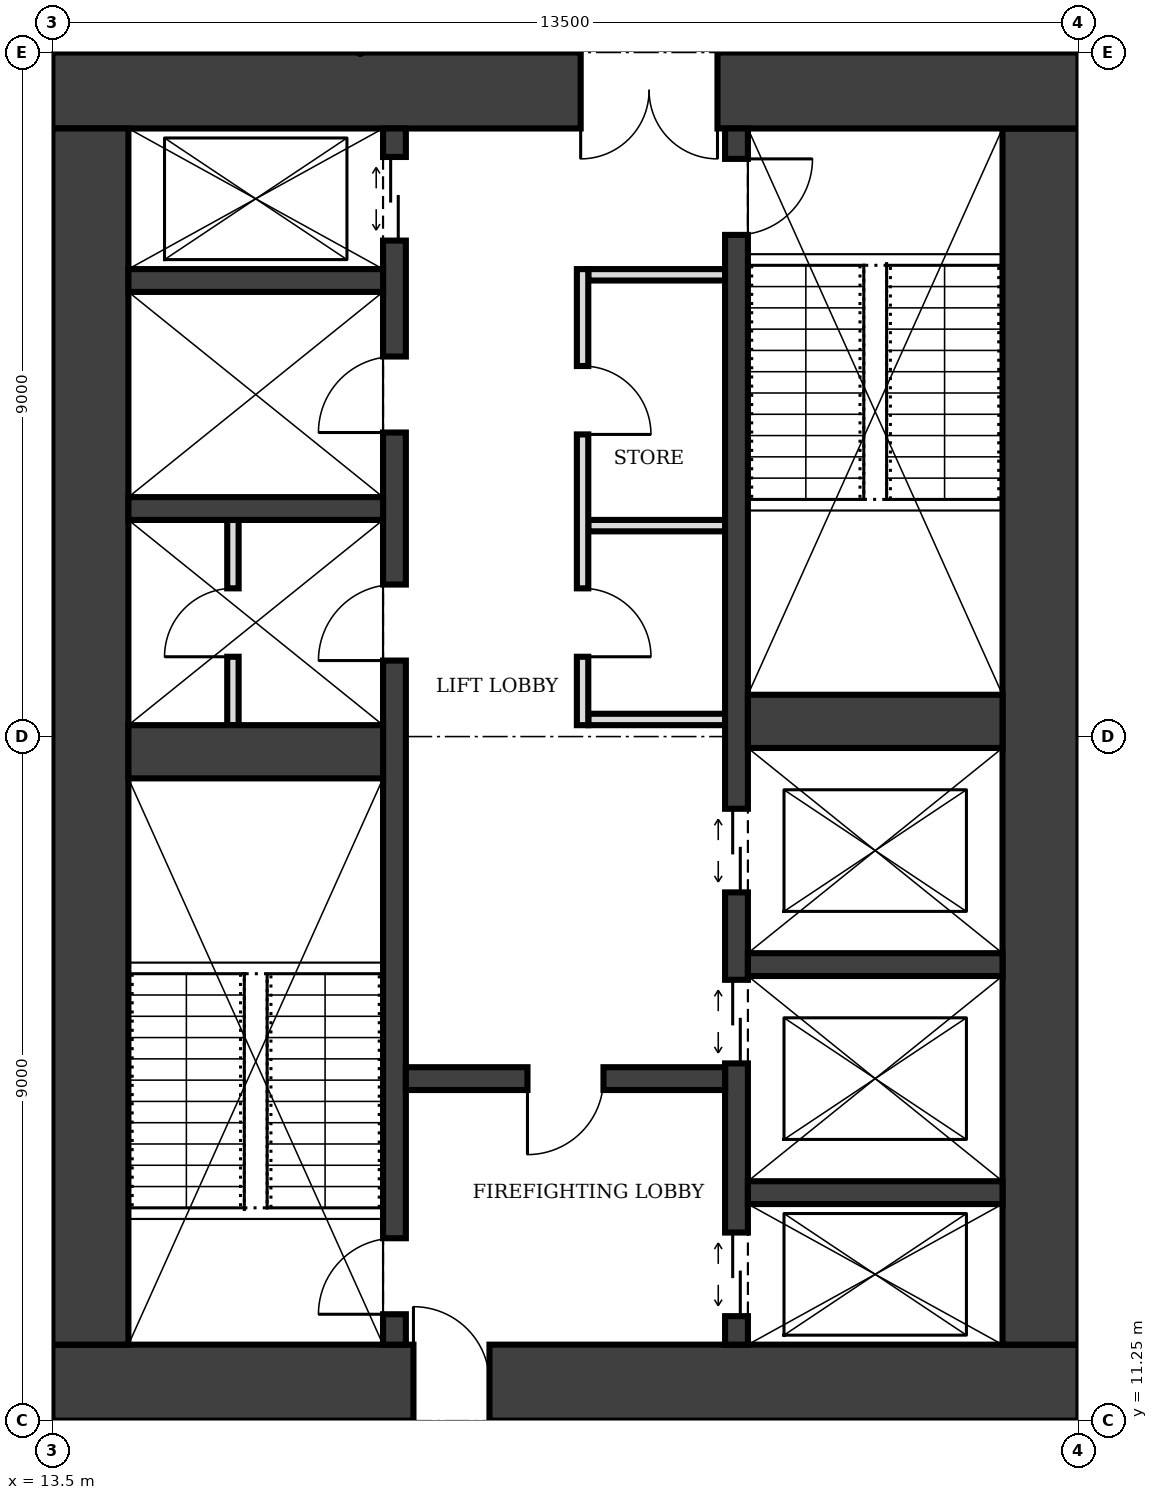
"""IFC4 building model, lengths in metres.
Left out: names, types, materials, properties, quantities, classifications, styles, units other than length and angle.
Written with IfcOpenShell. Run it as: python <this file> out.ifc"""

import sys

from ifc_helpers import new_model, si_unit, direction, frame, frame_2d, origin, place, context, subcontext, project, spatial, rectangle, extrude, element, fill, save


model = new_model("IFC4")
c1 = context("Model", 3, precision=1e-05, world=origin(), true_north=direction((0.0, 1.0)))
c2 = subcontext(c1, "Body", "Model", "MODEL_VIEW")
j1 = project(units=[si_unit("LENGTHUNIT", "METRE"), si_unit("PLANEANGLEUNIT", "RADIAN")], contexts=[c1])
p1 = place(None, origin())
s1 = spatial("IfcSite", under=j1, at=p1, CompositionType="ELEMENT")
p2 = place(p1, origin())
s2 = spatial("IfcBuilding", under=s1, at=p2, CompositionType="ELEMENT")
p3 = place(p2, frame((0.0, 0.0, 189.0)))
s3 = spatial("IfcBuildingStorey", under=s2, at=p3, CompositionType="ELEMENT", Elevation=189.0)
p4 = place(p3, frame((13.5, 11.75, 0.0), z_axis=(0.0, 0.0, 1.0), x_axis=(1.0, 0.0, 0.0)))
e1 = element("IfcWall", 1, at=p4, inside=s3, PredefinedType="SHEAR", context=c2, shape_type="SweptSolid", body=[
    extrude(rectangle(XDim=13.5, YDim=1.0, at=frame_2d((6.75, 0.0))), origin(), (0.0, 0.0, 1.0), 4.0),
])
p5 = place(p4, frame((4.75, 0.0, 0.0)))
e2 = element("IfcOpeningElement", 2, at=p5, cuts=e1, PredefinedType="OPENING", context=c2, shape_type="SweptSolid", body=[
    extrude(rectangle(XDim=1.0, YDim=2.1, at=frame_2d((0.5, 1.05))), frame((0.0, 0.51, 0.0), z_axis=(0.0, -1.0, 0.0), x_axis=(1.0, 0.0, 0.0)), (0.0, 0.0, 1.0), 1.02),
])
p6 = place(p3, frame((26.5, 12.25, 0.0), z_axis=(0.0, 0.0, 1.0), x_axis=(0.0, 1.0, 0.0)))
e3 = element("IfcWall", 3, at=p6, inside=s3, PredefinedType="SHEAR", context=c2, shape_type="SweptSolid", body=[
    extrude(rectangle(XDim=16.0, YDim=1.0, at=frame_2d((8.0, 0.0))), origin(), (0.0, 0.0, 1.0), 4.0),
])
p7 = place(p3, frame((27.0, 28.75, 0.0), z_axis=(0.0, 0.0, 1.0), x_axis=(-1.0, 0.0, 0.0)))
e4 = element("IfcWall", 4, at=p7, inside=s3, PredefinedType="SHEAR", context=c2, shape_type="SweptSolid", body=[
    extrude(rectangle(XDim=13.5, YDim=1.0, at=frame_2d((6.75, 0.0))), origin(), (0.0, 0.0, 1.0), 4.0),
])
p8 = place(p7, frame((4.75, 0.0, 0.0)))
e5 = element("IfcOpeningElement", 5, at=p8, cuts=e4, PredefinedType="OPENING", context=c2, shape_type="SweptSolid", body=[
    extrude(rectangle(XDim=1.8, YDim=2.1, at=frame_2d((0.9, 1.05))), frame((0.0, 0.51, 0.0), z_axis=(0.0, -1.0, 0.0), x_axis=(1.0, 0.0, 0.0)), (0.0, 0.0, 1.0), 1.02),
])
p9 = place(p3, frame((14.0, 28.25, 0.0), z_axis=(0.0, 0.0, 1.0), x_axis=(0.0, -1.0, 0.0)))
e6 = element("IfcWall", 6, at=p9, inside=s3, PredefinedType="SHEAR", context=c2, shape_type="SweptSolid", body=[
    extrude(rectangle(XDim=16.0, YDim=1.0, at=frame_2d((8.0, 0.0))), origin(), (0.0, 0.0, 1.0), 4.0),
])
p10 = place(p3, frame((18.0, 12.25, 0.0), z_axis=(0.0, 0.0, 1.0), x_axis=(0.0, 1.0, 0.0)))
e7 = element("IfcWall", 7, at=p10, inside=s3, PredefinedType="SHEAR", context=c2, shape_type="SweptSolid", body=[
    extrude(rectangle(XDim=16.0, YDim=0.3, at=frame_2d((8.0, 0.0))), origin(), (0.0, 0.0, 1.0), 4.0),
])
p11 = place(p10, frame((0.4, 0.0, 0.0)))
e8 = element("IfcOpeningElement", 8, at=p11, cuts=e7, PredefinedType="OPENING", context=c2, shape_type="SweptSolid", body=[
    extrude(rectangle(XDim=1.0, YDim=2.1, at=frame_2d((0.5, 1.05))), frame((0.0, 0.16, 0.0), z_axis=(0.0, -1.0, 0.0), x_axis=(1.0, 0.0, 0.0)), (0.0, 0.0, 1.0), 0.32),
])
p12 = place(p10, frame((14.525, 0.0, 0.0)))
e9 = element("IfcOpeningElement", 9, at=p12, cuts=e7, PredefinedType="OPENING", context=c2, shape_type="SweptSolid", body=[
    extrude(rectangle(XDim=1.1, YDim=2.1, at=frame_2d((0.55, 1.05))), frame((0.0, 0.16, 0.0), z_axis=(0.0, -1.0, 0.0), x_axis=(1.0, 0.0, 0.0)), (0.0, 0.0, 1.0), 0.32),
])
p13 = place(p10, frame((9.0, 0.0, 0.0)))
e10 = element("IfcOpeningElement", 10, at=p13, cuts=e7, PredefinedType="OPENING", context=c2, shape_type="SweptSolid", body=[
    extrude(rectangle(XDim=1.0, YDim=2.1, at=frame_2d((0.5, 1.05))), frame((0.0, 0.16, 0.0), z_axis=(0.0, -1.0, 0.0), x_axis=(1.0, 0.0, 0.0)), (0.0, 0.0, 1.0), 0.32),
])
p14 = place(p10, frame((12.0, 0.0, 0.0)))
e11 = element("IfcOpeningElement", 11, at=p14, cuts=e7, PredefinedType="OPENING", context=c2, shape_type="SweptSolid", body=[
    extrude(rectangle(XDim=1.0, YDim=2.1, at=frame_2d((0.5, 1.05))), frame((0.0, 0.16, 0.0), z_axis=(0.0, -1.0, 0.0), x_axis=(1.0, 0.0, 0.0)), (0.0, 0.0, 1.0), 0.32),
])
p15 = place(p3, frame((22.5, 12.25, 0.0), z_axis=(0.0, 0.0, 1.0), x_axis=(0.0, 1.0, 0.0)))
e12 = element("IfcWall", 12, at=p15, inside=s3, PredefinedType="SHEAR", context=c2, shape_type="SweptSolid", body=[
    extrude(rectangle(XDim=16.0, YDim=0.3, at=frame_2d((8.0, 0.0))), origin(), (0.0, 0.0, 1.0), 4.0),
])
p16 = place(p15, frame((14.6, 0.0, 0.0)))
e13 = element("IfcOpeningElement", 13, at=p16, cuts=e12, PredefinedType="OPENING", context=c2, shape_type="SweptSolid", body=[
    extrude(rectangle(XDim=1.0, YDim=2.1, at=frame_2d((0.5, 1.05))), frame((0.0, 0.16, 0.0), z_axis=(0.0, -1.0, 0.0), x_axis=(1.0, 0.0, 0.0)), (0.0, 0.0, 1.0), 0.32),
])
p17 = place(p15, frame((0.375, 0.0, 0.0)))
e14 = element("IfcOpeningElement", 14, at=p17, cuts=e12, PredefinedType="OPENING", context=c2, shape_type="SweptSolid", body=[
    extrude(rectangle(XDim=1.1, YDim=2.1, at=frame_2d((0.55, 1.05))), frame((0.0, 0.16, 0.0), z_axis=(0.0, -1.0, 0.0), x_axis=(1.0, 0.0, 0.0)), (0.0, 0.0, 1.0), 0.32),
])
p18 = place(p15, frame((3.7, 0.0, 0.0)))
e15 = element("IfcOpeningElement", 15, at=p18, cuts=e12, PredefinedType="OPENING", context=c2, shape_type="SweptSolid", body=[
    extrude(rectangle(XDim=1.1, YDim=2.1, at=frame_2d((0.55, 1.05))), frame((0.0, 0.16, 0.0), z_axis=(0.0, -1.0, 0.0), x_axis=(1.0, 0.0, 0.0)), (0.0, 0.0, 1.0), 0.32),
])
p19 = place(p15, frame((5.95, 0.0, 0.0)))
e16 = element("IfcOpeningElement", 16, at=p19, cuts=e12, PredefinedType="OPENING", context=c2, shape_type="SweptSolid", body=[
    extrude(rectangle(XDim=1.1, YDim=2.1, at=frame_2d((0.55, 1.05))), frame((0.0, 0.16, 0.0), z_axis=(0.0, -1.0, 0.0), x_axis=(1.0, 0.0, 0.0)), (0.0, 0.0, 1.0), 0.32),
])
p20 = place(p3, frame((14.5, 20.05, 0.0), z_axis=(0.0, 0.0, 1.0), x_axis=(1.0, 0.0, 0.0)))
e17 = element("IfcWall", 17, at=p20, inside=s3, PredefinedType="SHEAR", context=c2, shape_type="SweptSolid", body=[
    extrude(rectangle(XDim=3.35, YDim=0.7, at=frame_2d((1.675, 0.0))), origin(), (0.0, 0.0, 1.0), 4.0),
])
p21 = place(p3, frame((18.15, 15.75, 0.0), z_axis=(0.0, 0.0, 1.0), x_axis=(1.0, 0.0, 0.0)))
e18 = element("IfcWall", 18, at=p21, inside=s3, PredefinedType="SHEAR", context=c2, shape_type="SweptSolid", body=[
    extrude(rectangle(XDim=4.2, YDim=0.3, at=frame_2d((2.1, 0.0))), origin(), (0.0, 0.0, 1.0), 4.0),
])
p22 = place(p21, frame((1.6, 0.0, 0.0)))
e19 = element("IfcOpeningElement", 19, at=p22, cuts=e18, PredefinedType="OPENING", context=c2, shape_type="SweptSolid", body=[
    extrude(rectangle(XDim=1.0, YDim=2.1, at=frame_2d((0.5, 1.05))), frame((0.0, 0.16, 0.0), z_axis=(0.0, -1.0, 0.0), x_axis=(1.0, 0.0, 0.0)), (0.0, 0.0, 1.0), 0.32),
])
for number, where, z_axis, x_axis in (
    (20, (22.65, 14.25, 0.0), (0.0, 0.0, 1.0), (1.0, 0.0, 0.0)),
    (21, (22.65, 17.25, 0.0), (0.0, 0.0, 1.0), (1.0, 0.0, 0.0)),
):
    element("IfcWall", number, at=place(p3, frame(where, z_axis=z_axis, x_axis=x_axis)), inside=s3, PredefinedType="SHEAR", context=c2, shape_type="SweptSolid", body=[
        extrude(rectangle(XDim=3.35, YDim=0.3, at=frame_2d((1.675, 0.0))), origin(), (0.0, 0.0, 1.0), 4.0),
    ])
p23 = place(p3, frame((22.65, 20.45, 0.0), z_axis=(0.0, 0.0, 1.0), x_axis=(1.0, 0.0, 0.0)))
e22 = element("IfcWall", 22, at=p23, inside=s3, PredefinedType="SHEAR", context=c2, shape_type="SweptSolid", body=[
    extrude(rectangle(XDim=3.35, YDim=0.7, at=frame_2d((1.675, 0.0))), origin(), (0.0, 0.0, 1.0), 4.0),
])
for number, where, z_axis, x_axis in (
    (23, (14.5, 23.25, 0.0), (0.0, 0.0, 1.0), (1.0, 0.0, 0.0)),
    (24, (14.5, 26.25, 0.0), (0.0, 0.0, 1.0), (1.0, 0.0, 0.0)),
):
    element("IfcWall", number, at=place(p3, frame(where, z_axis=z_axis, x_axis=x_axis)), inside=s3, PredefinedType="SHEAR", context=c2, shape_type="SweptSolid", body=[
        extrude(rectangle(XDim=3.35, YDim=0.3, at=frame_2d((1.675, 0.0))), origin(), (0.0, 0.0, 1.0), 4.0),
    ])
p24 = place(p3, frame((20.475, 20.4, 0.0), z_axis=(0.0, 0.0, 1.0), x_axis=(0.0, 1.0, 0.0)))
e25 = element("IfcWall", 25, at=p24, inside=s3, PredefinedType="PARTITIONING", context=c2, shape_type="SweptSolid", body=[
    extrude(rectangle(XDim=6.0, YDim=0.15, at=frame_2d((3.0, 0.0))), origin(), (0.0, 0.0, 1.0), 3.75),
])
p25 = place(p24, frame((0.9, 0.0, 0.0)))
e26 = element("IfcOpeningElement", 26, at=p25, cuts=e25, PredefinedType="OPENING", context=c2, shape_type="SweptSolid", body=[
    extrude(rectangle(XDim=0.9, YDim=2.1, at=frame_2d((0.45, 1.05))), frame((0.0, 0.085, 0.0), z_axis=(0.0, -1.0, 0.0), x_axis=(1.0, 0.0, 0.0)), (0.0, 0.0, 1.0), 0.17),
])
p26 = place(p24, frame((3.825, 0.0, 0.0)))
e27 = element("IfcOpeningElement", 27, at=p26, cuts=e25, PredefinedType="OPENING", context=c2, shape_type="SweptSolid", body=[
    extrude(rectangle(XDim=0.9, YDim=2.1, at=frame_2d((0.45, 1.05))), frame((0.0, 0.085, 0.0), z_axis=(0.0, -1.0, 0.0), x_axis=(1.0, 0.0, 0.0)), (0.0, 0.0, 1.0), 0.17),
])
for number, where, z_axis, x_axis in (
    (28, (20.55, 20.475, 0.0), (0.0, 0.0, 1.0), (1.0, 0.0, 0.0)),
    (29, (20.55, 23.025, 0.0), (0.0, 0.0, 1.0), (1.0, 0.0, 0.0)),
    (30, (20.55, 26.325, 0.0), (0.0, 0.0, 1.0), (1.0, 0.0, 0.0)),
):
    element("IfcWall", number, at=place(p3, frame(where, z_axis=z_axis, x_axis=x_axis)), inside=s3, PredefinedType="PARTITIONING", context=c2, shape_type="SweptSolid", body=[
        extrude(rectangle(XDim=1.8, YDim=0.15, at=frame_2d((0.9, 0.0))), origin(), (0.0, 0.0, 1.0), 3.75),
    ])
p27 = place(p3, frame((15.875, 20.4, 0.0), z_axis=(0.0, 0.0, 1.0), x_axis=(0.0, 1.0, 0.0)))
e31 = element("IfcWall", 31, at=p27, inside=s3, PredefinedType="PARTITIONING", context=c2, shape_type="SweptSolid", body=[
    extrude(rectangle(XDim=2.7, YDim=0.15, at=frame_2d((1.35, 0.0))), origin(), (0.0, 0.0, 1.0), 3.75),
])
p28 = place(p27, frame((0.9, 0.0, 0.0)))
e32 = element("IfcOpeningElement", 32, at=p28, cuts=e31, PredefinedType="OPENING", context=c2, shape_type="SweptSolid", body=[
    extrude(rectangle(XDim=0.9, YDim=2.1, at=frame_2d((0.45, 1.05))), frame((0.0, 0.085, 0.0), z_axis=(0.0, -1.0, 0.0), x_axis=(1.0, 0.0, 0.0)), (0.0, 0.0, 1.0), 0.17),
])
p29 = place(p5, origin())
e33 = element("IfcDoor", 33, at=p29, inside=s3, OperationType="SINGLE_SWING_LEFT", PredefinedType="DOOR", context=c2, shape_type="SweptSolid", body=[
    extrude(rectangle(XDim=1.0, YDim=2.1, at=frame_2d((0.5, 1.05))), frame((0.0, 0.025, 0.0), z_axis=(0.0, -1.0, 0.0), x_axis=(1.0, 0.0, 0.0)), (0.0, 0.0, 1.0), 0.05),
])
fill(e2, e33)
p30 = place(p8, origin())
e34 = element("IfcDoor", 34, at=p30, inside=s3, OperationType="DOUBLE_DOOR_SINGLE_SWING", PredefinedType="DOOR", context=c2, shape_type="SweptSolid", body=[
    extrude(rectangle(XDim=1.8, YDim=2.1, at=frame_2d((0.9, 1.05))), frame((0.0, 0.025, 0.0), z_axis=(0.0, -1.0, 0.0), x_axis=(1.0, 0.0, 0.0)), (0.0, 0.0, 1.0), 0.05),
])
fill(e5, e34)
p31 = place(p22, frame((1.0, 0.0, 0.0), z_axis=(0.0, 0.0, 1.0), x_axis=(-1.0, 0.0, 0.0)))
e35 = element("IfcDoor", 35, at=p31, inside=s3, OperationType="SINGLE_SWING_RIGHT", PredefinedType="DOOR", context=c2, shape_type="SweptSolid", body=[
    extrude(rectangle(XDim=1.0, YDim=2.1, at=frame_2d((0.5, 1.05))), frame((0.0, 0.025, 0.0), z_axis=(0.0, -1.0, 0.0), x_axis=(1.0, 0.0, 0.0)), (0.0, 0.0, 1.0), 0.05),
])
fill(e19, e35)
p32 = place(p11, origin())
e36 = element("IfcDoor", 36, at=p32, inside=s3, OperationType="SINGLE_SWING_LEFT", PredefinedType="DOOR", context=c2, shape_type="SweptSolid", body=[
    extrude(rectangle(XDim=1.0, YDim=2.1, at=frame_2d((0.5, 1.05))), frame((0.0, 0.025, 0.0), z_axis=(0.0, -1.0, 0.0), x_axis=(1.0, 0.0, 0.0)), (0.0, 0.0, 1.0), 0.05),
])
fill(e8, e36)
p33 = place(p16, frame((1.0, 0.0, 0.0), z_axis=(0.0, 0.0, 1.0), x_axis=(-1.0, 0.0, 0.0)))
e37 = element("IfcDoor", 37, at=p33, inside=s3, OperationType="SINGLE_SWING_LEFT", PredefinedType="DOOR", context=c2, shape_type="SweptSolid", body=[
    extrude(rectangle(XDim=1.0, YDim=2.1, at=frame_2d((0.5, 1.05))), frame((0.0, 0.025, 0.0), z_axis=(0.0, -1.0, 0.0), x_axis=(1.0, 0.0, 0.0)), (0.0, 0.0, 1.0), 0.05),
])
fill(e13, e37)
p34 = place(p17, origin())
e38 = element("IfcDoor", 38, at=p34, inside=s3, OperationType="DOUBLE_DOOR_SLIDING", PredefinedType="DOOR", context=c2, shape_type="SweptSolid", body=[
    extrude(rectangle(XDim=1.1, YDim=2.1, at=frame_2d((0.55, 1.05))), frame((0.0, 0.025, 0.0), z_axis=(0.0, -1.0, 0.0), x_axis=(1.0, 0.0, 0.0)), (0.0, 0.0, 1.0), 0.05),
])
fill(e14, e38)
p35 = place(p12, origin())
e39 = element("IfcDoor", 39, at=p35, inside=s3, OperationType="DOUBLE_DOOR_SLIDING", PredefinedType="DOOR", context=c2, shape_type="SweptSolid", body=[
    extrude(rectangle(XDim=1.1, YDim=2.1, at=frame_2d((0.55, 1.05))), frame((0.0, 0.025, 0.0), z_axis=(0.0, -1.0, 0.0), x_axis=(1.0, 0.0, 0.0)), (0.0, 0.0, 1.0), 0.05),
])
fill(e9, e39)
p36 = place(p18, origin())
e40 = element("IfcDoor", 40, at=p36, inside=s3, OperationType="DOUBLE_DOOR_SLIDING", PredefinedType="DOOR", context=c2, shape_type="SweptSolid", body=[
    extrude(rectangle(XDim=1.1, YDim=2.1, at=frame_2d((0.55, 1.05))), frame((0.0, 0.025, 0.0), z_axis=(0.0, -1.0, 0.0), x_axis=(1.0, 0.0, 0.0)), (0.0, 0.0, 1.0), 0.05),
])
fill(e15, e40)
p37 = place(p19, origin())
e41 = element("IfcDoor", 41, at=p37, inside=s3, OperationType="DOUBLE_DOOR_SLIDING", PredefinedType="DOOR", context=c2, shape_type="SweptSolid", body=[
    extrude(rectangle(XDim=1.1, YDim=2.1, at=frame_2d((0.55, 1.05))), frame((0.0, 0.025, 0.0), z_axis=(0.0, -1.0, 0.0), x_axis=(1.0, 0.0, 0.0)), (0.0, 0.0, 1.0), 0.05),
])
fill(e16, e41)
p38 = place(p25, frame((0.9, 0.0, 0.0), z_axis=(0.0, 0.0, 1.0), x_axis=(-1.0, 0.0, 0.0)))
e42 = element("IfcDoor", 42, at=p38, inside=s3, OperationType="SINGLE_SWING_RIGHT", PredefinedType="DOOR", context=c2, shape_type="SweptSolid", body=[
    extrude(rectangle(XDim=0.9, YDim=2.1, at=frame_2d((0.45, 1.05))), frame((0.0, 0.025, 0.0), z_axis=(0.0, -1.0, 0.0), x_axis=(1.0, 0.0, 0.0)), (0.0, 0.0, 1.0), 0.05),
])
fill(e26, e42)
p39 = place(p26, frame((0.9, 0.0, 0.0), z_axis=(0.0, 0.0, 1.0), x_axis=(-1.0, 0.0, 0.0)))
e43 = element("IfcDoor", 43, at=p39, inside=s3, OperationType="SINGLE_SWING_RIGHT", PredefinedType="DOOR", context=c2, shape_type="SweptSolid", body=[
    extrude(rectangle(XDim=0.9, YDim=2.1, at=frame_2d((0.45, 1.05))), frame((0.0, 0.025, 0.0), z_axis=(0.0, -1.0, 0.0), x_axis=(1.0, 0.0, 0.0)), (0.0, 0.0, 1.0), 0.05),
])
fill(e27, e43)
p40 = place(p13, origin())
e44 = element("IfcDoor", 44, at=p40, inside=s3, OperationType="SINGLE_SWING_LEFT", PredefinedType="DOOR", context=c2, shape_type="SweptSolid", body=[
    extrude(rectangle(XDim=1.0, YDim=2.1, at=frame_2d((0.5, 1.05))), frame((0.0, 0.025, 0.0), z_axis=(0.0, -1.0, 0.0), x_axis=(1.0, 0.0, 0.0)), (0.0, 0.0, 1.0), 0.05),
])
fill(e10, e44)
p41 = place(p28, origin())
e45 = element("IfcDoor", 45, at=p41, inside=s3, OperationType="SINGLE_SWING_LEFT", PredefinedType="DOOR", context=c2, shape_type="SweptSolid", body=[
    extrude(rectangle(XDim=0.9, YDim=2.1, at=frame_2d((0.45, 1.05))), frame((0.0, 0.025, 0.0), z_axis=(0.0, -1.0, 0.0), x_axis=(1.0, 0.0, 0.0)), (0.0, 0.0, 1.0), 0.05),
])
fill(e32, e45)
p42 = place(p14, origin())
e46 = element("IfcDoor", 46, at=p42, inside=s3, OperationType="SINGLE_SWING_LEFT", PredefinedType="DOOR", context=c2, shape_type="SweptSolid", body=[
    extrude(rectangle(XDim=1.0, YDim=2.1, at=frame_2d((0.5, 1.05))), frame((0.0, 0.025, 0.0), z_axis=(0.0, -1.0, 0.0), x_axis=(1.0, 0.0, 0.0)), (0.0, 0.0, 1.0), 0.05),
])
fill(e11, e46)
save(model, sys.argv[1])
